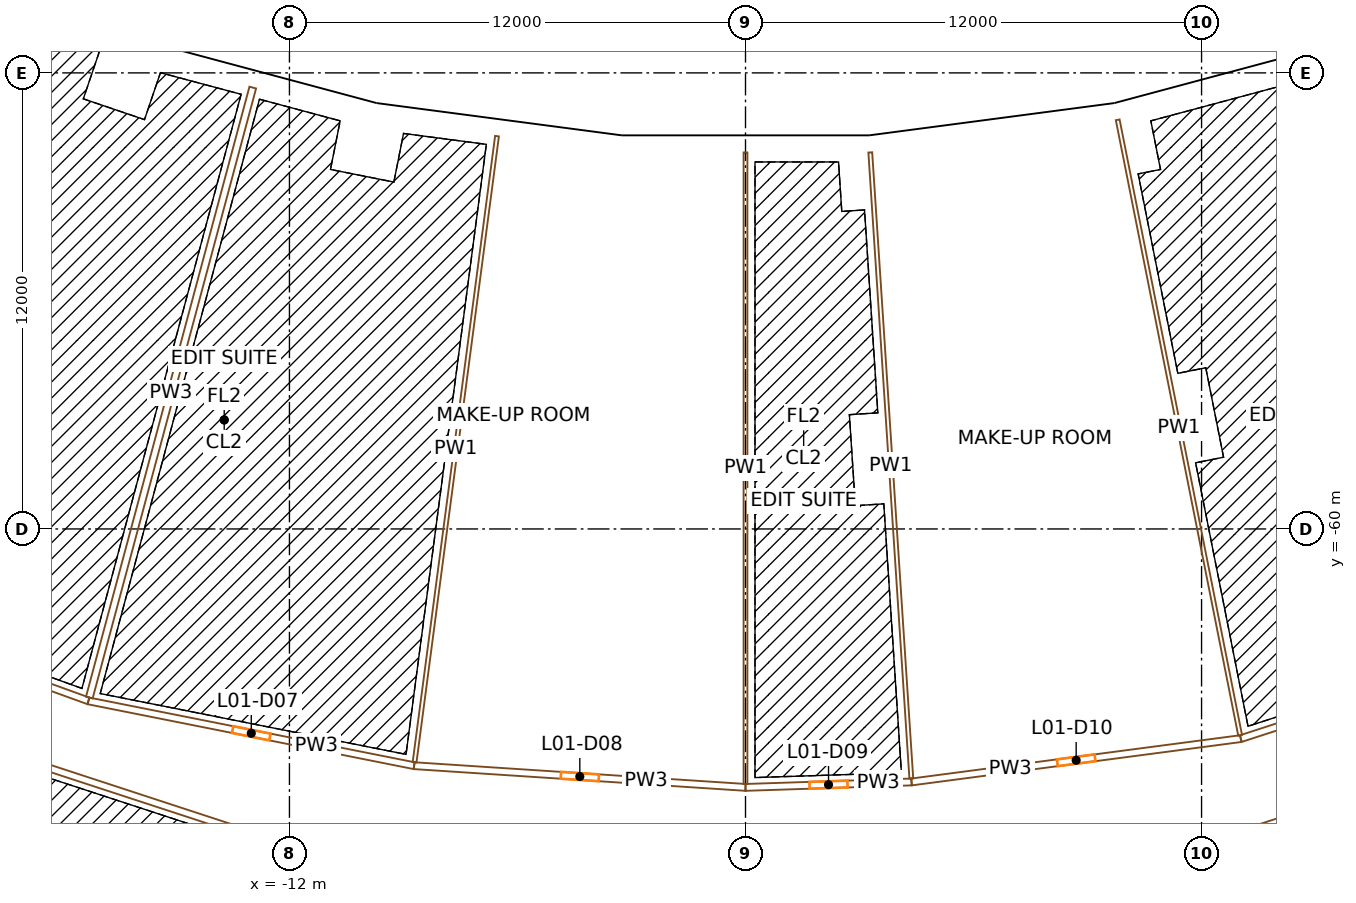
"""IFC4 building model, lengths in metres.
Left out: names, types, materials, properties, quantities, classifications, styles, units other than length and angle.
Written with IfcOpenShell. Run it as: python <this file> out.ifc"""

import sys

from ifc_helpers import new_model, si_unit, direction, frame, frame_2d, origin, origin_2d, place, context, subcontext, project, spatial, rectangle, extrude, element, fill, save


model = new_model("IFC4")
c1 = context("Model", 3, precision=1e-05, world=origin(), true_north=direction((0.0, 1.0)))
c2 = subcontext(c1, "Body", "Model", "MODEL_VIEW")
j1 = project(units=[si_unit("LENGTHUNIT", "METRE"), si_unit("PLANEANGLEUNIT", "RADIAN")], contexts=[c1])
p1 = place(None, origin())
s1 = spatial("IfcSite", under=j1, at=p1, CompositionType="ELEMENT")
p2 = place(p1, origin())
s2 = spatial("IfcBuilding", under=s1, at=p2, CompositionType="ELEMENT")
p3 = place(p2, frame((0.0, 0.0, 9.0)))
s3 = spatial("IfcBuildingStorey", under=s2, at=p3, CompositionType="ELEMENT", Elevation=9.0)
p4 = place(p3, frame((-16.313, -48.057, 0.0), z_axis=(0.0, 0.0, 1.0), x_axis=(0.946930129495, -0.321439465303, 0.0)))
e1 = element("IfcColumn", 1, at=p4, inside=s3, PredefinedType="COLUMN", context=c2, shape_type="SweptSolid", body=[
    extrude(rectangle(XDim=1.1, YDim=1.3, at=origin_2d()), origin(), (0.0, 0.0, 1.0), 9.0),
])
p5 = place(p3, frame((-18.724, -55.159, 0.0), z_axis=(0.0, 0.0, 1.0), x_axis=(0.946930129495, -0.321439465303, 0.0)))
e2 = element("IfcColumn", 2, at=p5, inside=s3, PredefinedType="COLUMN", context=c2, shape_type="SweptSolid", body=[
    extrude(rectangle(XDim=1.4, YDim=1.8, at=origin_2d()), origin(), (0.0, 0.0, 1.0), 9.0),
])
p6 = place(p3, frame((-9.901, -49.775, 0.0), z_axis=(0.0, 0.0, 1.0), x_axis=(0.980785280403, -0.195090322016, 0.0)))
e3 = element("IfcColumn", 3, at=p6, inside=s3, PredefinedType="COLUMN", context=c2, shape_type="SweptSolid", body=[
    extrude(rectangle(XDim=1.1, YDim=1.3, at=origin_2d()), origin(), (0.0, 0.0, 1.0), 9.0),
])
p7 = place(p3, frame((-11.364, -57.131, 0.0), z_axis=(0.0, 0.0, 1.0), x_axis=(0.980785280403, -0.195090322016, 0.0)))
e4 = element("IfcColumn", 4, at=p7, inside=s3, PredefinedType="COLUMN", context=c2, shape_type="SweptSolid", body=[
    extrude(rectangle(XDim=1.4, YDim=1.8, at=origin_2d()), origin(), (0.0, 0.0, 1.0), 9.0),
])
p8 = place(p3, frame((-3.319, -50.641, 0.0), z_axis=(0.0, 0.0, 1.0), x_axis=(0.997858923239, -0.06540312923, 0.0)))
e5 = element("IfcColumn", 5, at=p8, inside=s3, PredefinedType="COLUMN", context=c2, shape_type="SweptSolid", body=[
    extrude(rectangle(XDim=1.1, YDim=1.3, at=origin_2d()), origin(), (0.0, 0.0, 1.0), 9.0),
])
p9 = place(p3, frame((-3.81, -58.125, 0.0), z_axis=(0.0, 0.0, 1.0), x_axis=(0.997858923239, -0.06540312923, 0.0)))
e6 = element("IfcColumn", 6, at=p9, inside=s3, PredefinedType="COLUMN", context=c2, shape_type="SweptSolid", body=[
    extrude(rectangle(XDim=1.4, YDim=1.8, at=origin_2d()), origin(), (0.0, 0.0, 1.0), 9.0),
])
p10 = place(p3, frame((3.319, -50.641, 0.0), z_axis=(0.0, 0.0, 1.0), x_axis=(0.997858923239, 0.06540312923, 0.0)))
e7 = element("IfcColumn", 7, at=p10, inside=s3, PredefinedType="COLUMN", context=c2, shape_type="SweptSolid", body=[
    extrude(rectangle(XDim=1.1, YDim=1.3, at=origin_2d()), origin(), (0.0, 0.0, 1.0), 9.0),
])
p11 = place(p3, frame((3.81, -58.125, 0.0), z_axis=(0.0, 0.0, 1.0), x_axis=(0.997858923239, 0.06540312923, 0.0)))
e8 = element("IfcColumn", 8, at=p11, inside=s3, PredefinedType="COLUMN", context=c2, shape_type="SweptSolid", body=[
    extrude(rectangle(XDim=1.4, YDim=1.8, at=origin_2d()), origin(), (0.0, 0.0, 1.0), 9.0),
])
p12 = place(p3, frame((9.901, -49.775, 0.0), z_axis=(0.0, 0.0, 1.0), x_axis=(0.980785280403, 0.195090322016, 0.0)))
e9 = element("IfcColumn", 9, at=p12, inside=s3, PredefinedType="COLUMN", context=c2, shape_type="SweptSolid", body=[
    extrude(rectangle(XDim=1.1, YDim=1.3, at=origin_2d()), origin(), (0.0, 0.0, 1.0), 9.0),
])
p13 = place(p3, frame((11.364, -57.131, 0.0), z_axis=(0.0, 0.0, 1.0), x_axis=(0.980785280403, 0.195090322016, 0.0)))
e10 = element("IfcColumn", 10, at=p13, inside=s3, PredefinedType="COLUMN", context=c2, shape_type="SweptSolid", body=[
    extrude(rectangle(XDim=1.4, YDim=1.8, at=origin_2d()), origin(), (0.0, 0.0, 1.0), 9.0),
])
p14 = place(p3, frame((3.21, -49.868, 0.0), z_axis=(0.0, 0.0, 1.0), x_axis=(-1.0, 0.0, 0.0)))
e11 = element("IfcWall", 11, at=p14, inside=s3, PredefinedType="SOLIDWALL", context=c2, shape_type="SweptSolid", body=[
    extrude(rectangle(XDim=6.419, YDim=0.45, at=frame_2d((3.21, 0.0))), origin(), (0.0, 0.0, 1.0), 7.7),
])
p15 = place(p3, frame((9.78, -49.011, 0.0), z_axis=(0.0, 0.0, 1.0), x_axis=(-0.991445350147, -0.130522479563, 0.0)))
e12 = element("IfcWall", 12, at=p15, inside=s3, PredefinedType="SOLIDWALL", context=c2, shape_type="SweptSolid", body=[
    extrude(rectangle(XDim=6.597, YDim=0.45, at=frame_2d((3.299, 0.0))), origin(), (0.0, 0.0, 1.0), 7.7),
])
p16 = place(p3, frame((16.007, -47.339, 0.0), z_axis=(0.0, 0.0, 1.0), x_axis=(-0.965926830738, -0.25881529642, 0.0)))
e13 = element("IfcWall", 13, at=p16, inside=s3, PredefinedType="SOLIDWALL", context=c2, shape_type="SweptSolid", body=[
    extrude(rectangle(XDim=6.419, YDim=0.45, at=frame_2d((3.209, 0.0))), origin(), (0.0, 0.0, 1.0), 7.7),
])
p17 = place(p3, frame((-16.036, -47.335, 0.0), z_axis=(0.0, 0.0, 1.0), x_axis=(-0.923877459804, 0.382688436284, 0.0)))
e14 = element("IfcWall", 14, at=p17, inside=s3, PredefinedType="SOLIDWALL", context=c2, shape_type="SweptSolid", body=[
    extrude(rectangle(XDim=6.597, YDim=0.45, at=frame_2d((3.299, 0.0))), origin(), (0.0, 0.0, 1.0), 7.7),
])
p18 = place(p3, frame((-9.807, -49.0, 0.0), z_axis=(0.0, 0.0, 1.0), x_axis=(-0.965926830738, 0.25881529642, 0.0)))
e15 = element("IfcWall", 15, at=p18, inside=s3, PredefinedType="SOLIDWALL", context=c2, shape_type="SweptSolid", body=[
    extrude(rectangle(XDim=6.419, YDim=0.45, at=frame_2d((3.209, 0.0))), origin(), (0.0, 0.0, 1.0), 7.7),
])
p19 = place(p3, frame((-3.239, -49.872, 0.0), z_axis=(0.0, 0.0, 1.0), x_axis=(-0.991445350147, 0.130522479563, 0.0)))
e16 = element("IfcWall", 16, at=p19, inside=s3, PredefinedType="SOLIDWALL", context=c2, shape_type="SweptSolid", body=[
    extrude(rectangle(XDim=6.597, YDim=0.45, at=frame_2d((3.299, 0.0))), origin(), (0.0, 0.0, 1.0), 7.7),
])
p20 = place(p3, frame((-13.5, -67.87, 0.0), z_axis=(0.0, 0.0, 1.0), x_axis=(-0.95037928892, 0.31109356662, 0.0)))
e17 = element("IfcWall", 17, at=p20, inside=s3, PredefinedType="PARTITIONING", context=c2, shape_type="SweptSolid", body=[
    extrude(rectangle(XDim=16.477, YDim=0.18, at=frame_2d((8.239, 0.0))), origin(), (0.0, 0.0, 1.0), 7.6),
])
p21 = place(p20, frame((7.339, 0.0, 0.0)))
e18 = element("IfcOpeningElement", 18, at=p21, cuts=e17, PredefinedType="OPENING", context=c2, shape_type="SweptSolid", body=[
    extrude(rectangle(XDim=1.8, YDim=2.4, at=frame_2d((0.9, 1.2))), frame((0.0, 0.1, 0.0), z_axis=(0.0, -1.0, 0.0), x_axis=(1.0, 0.0, 0.0)), (0.0, 0.0, 1.0), 0.2),
])
p22 = place(p3, frame((-27.906, -60.683, 0.0), z_axis=(0.0, 0.0, 1.0), x_axis=(0.94036474664, -0.340167816345, 0.0)))
e19 = element("IfcWall", 19, at=p22, inside=s3, PredefinedType="PARTITIONING", context=c2, shape_type="SweptSolid", body=[
    extrude(rectangle(XDim=11.29, YDim=0.18, at=frame_2d((5.645, 0.0))), origin(), (0.0, 0.0, 1.0), 7.6),
])
p23 = place(p22, frame((4.745, 0.0, 0.0)))
e20 = element("IfcOpeningElement", 20, at=p23, cuts=e19, PredefinedType="OPENING", context=c2, shape_type="SweptSolid", body=[
    extrude(rectangle(XDim=1.8, YDim=2.1, at=frame_2d((0.9, 1.05))), frame((0.0, 0.1, 0.0), z_axis=(0.0, -1.0, 0.0), x_axis=(1.0, 0.0, 0.0)), (0.0, 0.0, 1.0), 0.2),
])
p24 = place(p3, frame((-17.289, -64.524, 0.0), z_axis=(0.0, 0.0, 1.0), x_axis=(0.980786466832, -0.195084357342, 0.0)))
e21 = element("IfcWall", 21, at=p24, inside=s3, PredefinedType="PARTITIONING", context=c2, shape_type="SweptSolid", body=[
    extrude(rectangle(XDim=8.738, YDim=0.18, at=frame_2d((4.369, 0.0))), origin(), (0.0, 0.0, 1.0), 7.6),
])
p25 = place(p24, frame((3.869, 0.0, 0.0)))
e22 = element("IfcOpeningElement", 22, at=p25, cuts=e21, PredefinedType="OPENING", context=c2, shape_type="SweptSolid", body=[
    extrude(rectangle(XDim=1.0, YDim=2.1, at=frame_2d((0.5, 1.05))), frame((0.0, 0.1, 0.0), z_axis=(0.0, -1.0, 0.0), x_axis=(1.0, 0.0, 0.0)), (0.0, 0.0, 1.0), 0.2),
])
p26 = place(p3, frame((-12.965, -48.386, 0.0), z_axis=(0.0, 0.0, 1.0), x_axis=(-0.258822009397, -0.965925032004, 0.0)))
e23 = element("IfcWall", 23, at=p26, inside=s3, PredefinedType="PARTITIONING", context=c2, shape_type="SweptSolid", body=[
    extrude(rectangle(XDim=16.617, YDim=0.18, at=frame_2d((8.308, 0.0))), origin(), (0.0, 0.0, 1.0), 7.6),
])
p27 = place(p3, frame((-8.719, -66.229, 0.0), z_axis=(0.0, 0.0, 1.0), x_axis=(0.997858593599, -0.065408158359, 0.0)))
e24 = element("IfcWall", 24, at=p27, inside=s3, PredefinedType="PARTITIONING", context=c2, shape_type="SweptSolid", body=[
    extrude(rectangle(XDim=8.738, YDim=0.18, at=frame_2d((4.369, 0.0))), origin(), (0.0, 0.0, 1.0), 7.6),
])
p28 = place(p27, frame((3.869, 0.0, 0.0)))
e25 = element("IfcOpeningElement", 25, at=p28, cuts=e24, PredefinedType="OPENING", context=c2, shape_type="SweptSolid", body=[
    extrude(rectangle(XDim=1.0, YDim=2.1, at=frame_2d((0.5, 1.05))), frame((0.0, 0.1, 0.0), z_axis=(0.0, -1.0, 0.0), x_axis=(1.0, 0.0, 0.0)), (0.0, 0.0, 1.0), 0.2),
])
p29 = place(p3, frame((-6.539, -49.665, 0.0), z_axis=(0.0, 0.0, 1.0), x_axis=(-0.130529385637, -0.991444440947, 0.0)))
e26 = element("IfcWall", 26, at=p29, inside=s3, PredefinedType="PARTITIONING", context=c2, shape_type="SweptSolid", body=[
    extrude(rectangle(XDim=16.616, YDim=0.1, at=frame_2d((8.308, 0.0))), origin(), (0.0, 0.0, 1.0), 7.6),
])
p30 = place(p3, frame((0.0, -66.8, 0.0), z_axis=(0.0, 0.0, 1.0), x_axis=(0.99946426167, 0.03272903366, 0.0)))
e27 = element("IfcWall", 27, at=p30, inside=s3, PredefinedType="PARTITIONING", context=c2, shape_type="SweptSolid", body=[
    extrude(rectangle(XDim=4.371, YDim=0.18, at=frame_2d((2.186, 0.0))), origin(), (0.0, 0.0, 1.0), 7.6),
])
p31 = place(p30, frame((1.686, 0.0, 0.0)))
e28 = element("IfcOpeningElement", 28, at=p31, cuts=e27, PredefinedType="OPENING", context=c2, shape_type="SweptSolid", body=[
    extrude(rectangle(XDim=1.0, YDim=2.1, at=frame_2d((0.5, 1.05))), frame((0.0, 0.1, 0.0), z_axis=(0.0, -1.0, 0.0), x_axis=(1.0, 0.0, 0.0)), (0.0, 0.0, 1.0), 0.2),
])
p32 = place(p3, frame((0.0, -50.094, 0.0), z_axis=(0.0, 0.0, 1.0), x_axis=(0.0, -1.0, 0.0)))
e29 = element("IfcWall", 29, at=p32, inside=s3, PredefinedType="PARTITIONING", context=c2, shape_type="SweptSolid", body=[
    extrude(rectangle(XDim=16.616, YDim=0.1, at=frame_2d((8.308, 0.0))), origin(), (0.0, 0.0, 1.0), 7.6),
])
p33 = place(p3, frame((3.283, -50.093, 0.0), z_axis=(0.0, 0.0, 1.0), x_axis=(0.065405001109, -0.997858800547, 0.0)))
e30 = element("IfcWall", 30, at=p33, inside=s3, PredefinedType="PARTITIONING", context=c2, shape_type="SweptSolid", body=[
    extrude(rectangle(XDim=16.51, YDim=0.1, at=frame_2d((8.255, 0.0))), origin(), (0.0, 0.0, 1.0), 7.6),
])
p34 = place(p3, frame((4.369, -66.657, 0.0), z_axis=(0.0, 0.0, 1.0), x_axis=(0.991443260322, 0.130538352841, 0.0)))
e31 = element("IfcWall", 31, at=p34, inside=s3, PredefinedType="PARTITIONING", context=c2, shape_type="SweptSolid", body=[
    extrude(rectangle(XDim=8.738, YDim=0.18, at=frame_2d((4.369, 0.0))), origin(), (0.0, 0.0, 1.0), 7.6),
])
p35 = place(p34, frame((3.869, 0.0, 0.0)))
e32 = element("IfcOpeningElement", 32, at=p35, cuts=e31, PredefinedType="OPENING", context=c2, shape_type="SweptSolid", body=[
    extrude(rectangle(XDim=1.0, YDim=2.1, at=frame_2d((0.5, 1.05))), frame((0.0, 0.1, 0.0), z_axis=(0.0, -1.0, 0.0), x_axis=(1.0, 0.0, 0.0)), (0.0, 0.0, 1.0), 0.2),
])
p36 = place(p3, frame((9.793, -49.235, 0.0), z_axis=(0.0, 0.0, 1.0), x_axis=(0.195089444663, -0.980785454919, 0.0)))
e33 = element("IfcWall", 33, at=p36, inside=s3, PredefinedType="PARTITIONING", context=c2, shape_type="SweptSolid", body=[
    extrude(rectangle(XDim=16.51, YDim=0.1, at=frame_2d((8.255, 0.0))), origin(), (0.0, 0.0, 1.0), 7.6),
])
p37 = place(p3, frame((13.032, -65.516, 0.0), z_axis=(0.0, 0.0, 1.0), x_axis=(0.950996699022, 0.309201032419, 0.0)))
e34 = element("IfcWall", 34, at=p37, inside=s3, PredefinedType="PARTITIONING", context=c2, shape_type="SweptSolid", body=[
    extrude(rectangle(XDim=15.654, YDim=0.18, at=frame_2d((7.827, 0.0))), origin(), (0.0, 0.0, 1.0), 7.6),
])
p38 = place(p37, frame((6.927, 0.0, 0.0)))
e35 = element("IfcOpeningElement", 35, at=p38, cuts=e34, PredefinedType="OPENING", context=c2, shape_type="SweptSolid", body=[
    extrude(rectangle(XDim=1.8, YDim=2.1, at=frame_2d((0.9, 1.05))), frame((0.0, 0.1, 0.0), z_axis=(0.0, -1.0, 0.0), x_axis=(1.0, 0.0, 0.0)), (0.0, 0.0, 1.0), 0.2),
])
p39 = place(p3, frame((29.16, -62.744, 0.0), z_axis=(0.0, 0.0, 1.0), x_axis=(-0.95037928892, -0.31109356662, 0.0)))
e36 = element("IfcWall", 36, at=p39, inside=s3, PredefinedType="PARTITIONING", context=c2, shape_type="SweptSolid", body=[
    extrude(rectangle(XDim=16.477, YDim=0.18, at=frame_2d((8.239, 0.0))), origin(), (0.0, 0.0, 1.0), 7.6),
])
p40 = place(p39, frame((7.339, 0.0, 0.0)))
e37 = element("IfcOpeningElement", 37, at=p40, cuts=e36, PredefinedType="OPENING", context=c2, shape_type="SweptSolid", body=[
    extrude(rectangle(XDim=1.8, YDim=2.4, at=frame_2d((0.9, 1.2))), frame((0.0, 0.1, 0.0), z_axis=(0.0, -1.0, 0.0), x_axis=(1.0, 0.0, 0.0)), (0.0, 0.0, 1.0), 0.2),
])
p41 = place(p25, origin())
e38 = element("IfcDoor", 38, at=p41, inside=s3, OperationType="SINGLE_SWING_RIGHT", PredefinedType="DOOR", context=c2, shape_type="SweptSolid", body=[
    extrude(rectangle(XDim=1.0, YDim=2.1, at=frame_2d((0.5, 1.05))), frame((0.0, 0.025, 0.0), z_axis=(0.0, -1.0, 0.0), x_axis=(1.0, 0.0, 0.0)), (0.0, 0.0, 1.0), 0.05),
])
fill(e22, e38)
p42 = place(p28, origin())
e39 = element("IfcDoor", 39, at=p42, inside=s3, OperationType="SINGLE_SWING_RIGHT", PredefinedType="DOOR", context=c2, shape_type="SweptSolid", body=[
    extrude(rectangle(XDim=1.0, YDim=2.1, at=frame_2d((0.5, 1.05))), frame((0.0, 0.025, 0.0), z_axis=(0.0, -1.0, 0.0), x_axis=(1.0, 0.0, 0.0)), (0.0, 0.0, 1.0), 0.05),
])
fill(e25, e39)
p43 = place(p31, origin())
e40 = element("IfcDoor", 40, at=p43, inside=s3, OperationType="SINGLE_SWING_RIGHT", PredefinedType="DOOR", context=c2, shape_type="SweptSolid", body=[
    extrude(rectangle(XDim=1.0, YDim=2.1, at=frame_2d((0.5, 1.05))), frame((0.0, 0.025, 0.0), z_axis=(0.0, -1.0, 0.0), x_axis=(1.0, 0.0, 0.0)), (0.0, 0.0, 1.0), 0.05),
])
fill(e28, e40)
p44 = place(p35, origin())
e41 = element("IfcDoor", 41, at=p44, inside=s3, OperationType="SINGLE_SWING_RIGHT", PredefinedType="DOOR", context=c2, shape_type="SweptSolid", body=[
    extrude(rectangle(XDim=1.0, YDim=2.1, at=frame_2d((0.5, 1.05))), frame((0.0, 0.025, 0.0), z_axis=(0.0, -1.0, 0.0), x_axis=(1.0, 0.0, 0.0)), (0.0, 0.0, 1.0), 0.05),
])
fill(e32, e41)
save(model, sys.argv[1])
